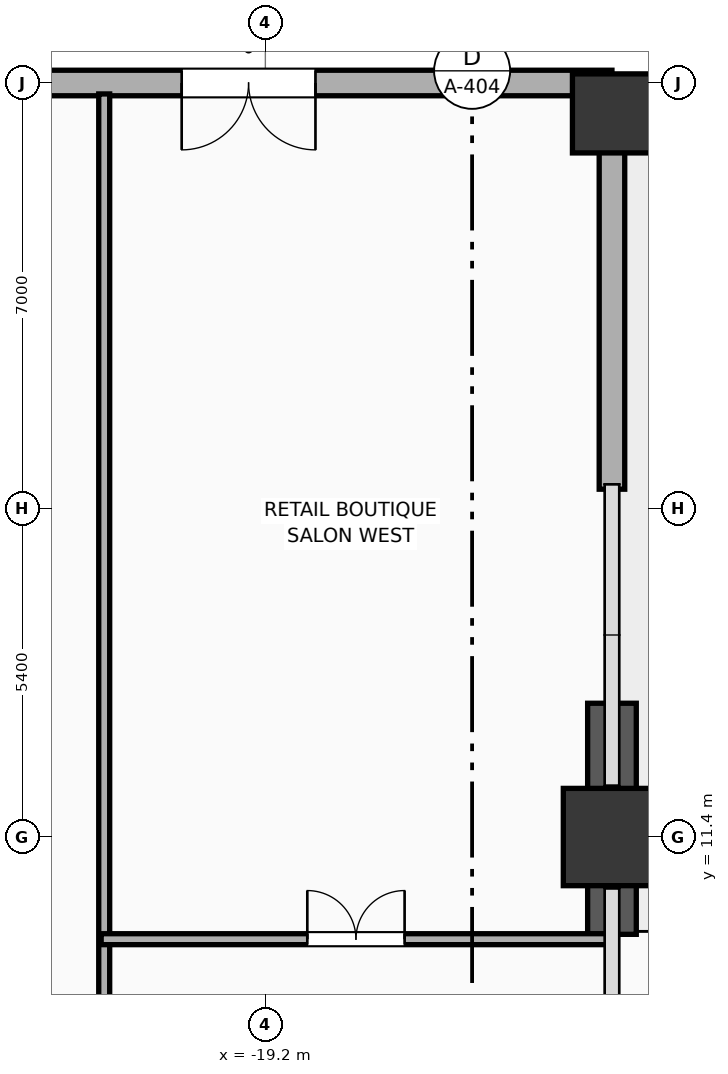
"""IFC4 building model, lengths in metres.
Left out: names, types, materials, properties, quantities, classifications, styles, units other than length and angle.
Written with IfcOpenShell. Run it as: python <this file> out.ifc"""

import sys

from ifc_helpers import new_model, si_unit, direction, frame, frame_2d, origin, origin_2d, place, context, subcontext, project, spatial, rectangle, extrude, element, fill, save


model = new_model("IFC4")
c1 = context("Model", 3, precision=1e-05, world=origin(), true_north=direction((0.0, 1.0)))
c2 = subcontext(c1, "Body", "Model", "MODEL_VIEW")
j1 = project(units=[si_unit("LENGTHUNIT", "METRE"), si_unit("PLANEANGLEUNIT", "RADIAN")], contexts=[c1])
p1 = place(None, origin())
s1 = spatial("IfcSite", under=j1, at=p1, CompositionType="ELEMENT")
p2 = place(p1, origin())
s2 = spatial("IfcBuilding", under=s1, at=p2, CompositionType="ELEMENT")
p3 = place(p2, origin())
s3 = spatial("IfcBuildingStorey", under=s2, at=p3, CompositionType="ELEMENT", Elevation=0.0)
p4 = place(p3, frame((-13.5, 11.4, 0.0), z_axis=(0.0, 0.0, 1.0), x_axis=(1.0, 0.0, 0.0)))
e1 = element("IfcColumn", 1, at=p4, inside=s3, PredefinedType="COLUMN", context=c2, shape_type="SweptSolid", body=[
    extrude(rectangle(XDim=1.6, YDim=1.6, at=origin_2d()), origin(), (0.0, 0.0, 1.0), 5.2),
])
p5 = place(p3, frame((-13.5, 23.3, 0.0), z_axis=(0.0, 0.0, 1.0), x_axis=(1.0, 0.0, 0.0)))
e2 = element("IfcColumn", 2, at=p5, inside=s3, PredefinedType="COLUMN", context=c2, shape_type="SweptSolid", body=[
    extrude(rectangle(XDim=1.3, YDim=1.3, at=origin_2d()), origin(), (0.0, 0.0, 1.0), 5.2),
])
p6 = place(p3, frame((-13.5, 9.8, 0.0), z_axis=(0.0, 0.0, 1.0), x_axis=(0.0, 1.0, 0.0)))
e3 = element("IfcWall", 3, at=p6, inside=s3, PredefinedType="SOLIDWALL", context=c2, shape_type="SweptSolid", body=[
    extrude(rectangle(XDim=3.8, YDim=0.8, at=frame_2d((1.9, 0.0))), origin(), (0.0, 0.0, 1.0), 4.92),
])
p7 = place(p3, frame((-13.5, 17.12, 0.0), z_axis=(0.0, 0.0, 1.0), x_axis=(0.0, 1.0, 0.0)))
e4 = element("IfcWall", 4, at=p7, inside=s3, PredefinedType="ELEMENTEDWALL", context=c2, shape_type="SweptSolid", body=[
    extrude(rectangle(XDim=6.68, YDim=0.42, at=frame_2d((3.34, 0.0))), origin(), (0.0, 0.0, 1.0), 4.21),
])
p8 = place(p3, frame((-13.5, 23.8, 0.0), z_axis=(0.0, 0.0, 1.0), x_axis=(-1.0, 0.0, 0.0)))
e5 = element("IfcWall", 5, at=p8, inside=s3, PredefinedType="ELEMENTEDWALL", context=c2, shape_type="SweptSolid", body=[
    extrude(rectangle(XDim=24.9, YDim=0.42, at=frame_2d((12.45, 0.0))), origin(), (0.0, 0.0, 1.0), 4.92),
])
p9 = place(p8, frame((19.5, 0.0, 0.0)))
e6 = element("IfcOpeningElement", 6, at=p9, cuts=e5, PredefinedType="OPENING", context=c2, shape_type="SweptSolid", body=[
    extrude(rectangle(XDim=3.6, YDim=3.0, at=frame_2d((1.8, 1.5))), frame((0.0, 0.22, 0.0), z_axis=(0.0, -1.0, 0.0), x_axis=(1.0, 0.0, 0.0)), (0.0, 0.0, 1.0), 0.44),
])
p10 = place(p8, frame((4.876, 0.0, 0.0)))
e7 = element("IfcOpeningElement", 7, at=p10, cuts=e5, PredefinedType="OPENING", context=c2, shape_type="SweptSolid", body=[
    extrude(rectangle(XDim=2.2, YDim=2.4, at=frame_2d((1.1, 1.2))), frame((0.0, 0.22, 0.0), z_axis=(0.0, -1.0, 0.0), x_axis=(1.0, 0.0, 0.0)), (0.0, 0.0, 1.0), 0.44),
])
p11 = place(p3, frame((-21.85, -10.5, 0.0), z_axis=(0.0, 0.0, 1.0), x_axis=(0.0, 1.0, 0.0)))
e8 = element("IfcWall", 8, at=p11, inside=s3, PredefinedType="PARTITIONING", context=c2, shape_type="SweptSolid", body=[
    extrude(rectangle(XDim=34.12, YDim=0.18, at=frame_2d((17.06, 0.0))), origin(), (0.0, 0.0, 1.0), 4.92),
])
p12 = place(p11, frame((13.531, 0.0, 0.0)))
e9 = element("IfcOpeningElement", 9, at=p12, cuts=e8, PredefinedType="OPENING", context=c2, shape_type="SweptSolid", body=[
    extrude(rectangle(XDim=1.6, YDim=2.05, at=frame_2d((0.8, 1.025))), frame((0.0, 0.1, 0.0), z_axis=(0.0, -1.0, 0.0), x_axis=(1.0, 0.0, 0.0)), (0.0, 0.0, 1.0), 0.2),
])
p13 = place(p3, frame((-21.9, 9.72, 0.0), z_axis=(0.0, 0.0, 1.0), x_axis=(1.0, 0.0, 0.0)))
e10 = element("IfcWall", 10, at=p13, inside=s3, PredefinedType="PARTITIONING", context=c2, shape_type="SweptSolid", body=[
    extrude(rectangle(XDim=8.38, YDim=0.18, at=frame_2d((4.19, 0.0))), origin(), (0.0, 0.0, 1.0), 4.92),
])
p14 = place(p13, frame((3.39, 0.0, 0.0)))
e11 = element("IfcOpeningElement", 11, at=p14, cuts=e10, PredefinedType="OPENING", context=c2, shape_type="SweptSolid", body=[
    extrude(rectangle(XDim=1.6, YDim=2.05, at=frame_2d((0.8, 1.025))), frame((0.0, 0.1, 0.0), z_axis=(0.0, -1.0, 0.0), x_axis=(1.0, 0.0, 0.0)), (0.0, 0.0, 1.0), 0.2),
])
p15 = place(p10, origin())
e12 = element("IfcDoor", 12, at=p15, inside=s3, OperationType="DOUBLE_DOOR_SINGLE_SWING", PredefinedType="DOOR", context=c2, shape_type="SweptSolid", body=[
    extrude(rectangle(XDim=2.2, YDim=2.4, at=frame_2d((1.1, 1.2))), frame((0.0, 0.025, 0.0), z_axis=(0.0, -1.0, 0.0), x_axis=(1.0, 0.0, 0.0)), (0.0, 0.0, 1.0), 0.05),
])
fill(e7, e12)
p16 = place(p14, origin())
e13 = element("IfcDoor", 13, at=p16, inside=s3, OperationType="DOUBLE_DOOR_SINGLE_SWING", PredefinedType="DOOR", context=c2, shape_type="SweptSolid", body=[
    extrude(rectangle(XDim=1.6, YDim=2.05, at=frame_2d((0.8, 1.025))), frame((0.0, 0.025, 0.0), z_axis=(0.0, -1.0, 0.0), x_axis=(1.0, 0.0, 0.0)), (0.0, 0.0, 1.0), 0.05),
])
fill(e11, e13)
save(model, sys.argv[1])
